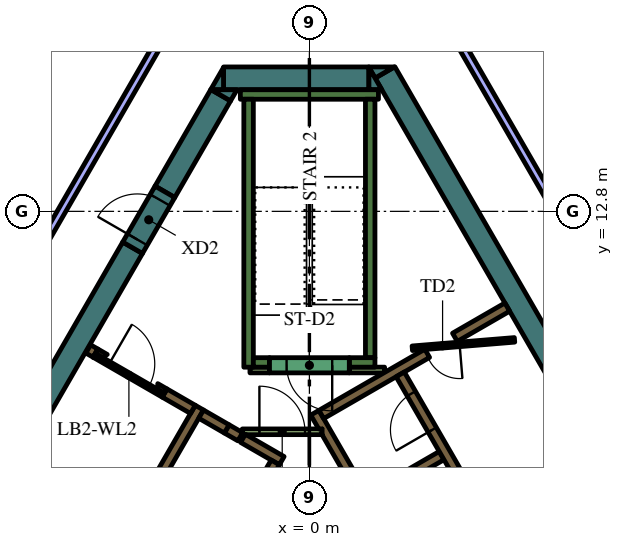
"""IFC4 building model, lengths in metres.
Left out: names, types, materials, properties, quantities, classifications, styles, units other than length and angle.
Written with IfcOpenShell. Run it as: python <this file> out.ifc"""

import sys

from ifc_helpers import new_model, si_unit, direction, frame, frame_2d, origin, place, context, subcontext, project, spatial, polyline, rectangle, outline, extrude, element, fill, save


model = new_model("IFC4")
c1 = context("Model", 3, precision=1e-05, world=origin(), true_north=direction((0.0, 1.0)))
c2 = subcontext(c1, "Body", "Model", "MODEL_VIEW")
j1 = project(units=[si_unit("LENGTHUNIT", "METRE"), si_unit("PLANEANGLEUNIT", "RADIAN")], contexts=[c1])
p1 = place(None, origin())
s1 = spatial("IfcSite", under=j1, at=p1, CompositionType="ELEMENT")
p2 = place(p1, origin())
s2 = spatial("IfcBuilding", under=s1, at=p2, CompositionType="ELEMENT")
p3 = place(p2, frame((0.0, 0.0, 283.8)))
s3 = spatial("IfcBuildingStorey", under=s2, at=p3, CompositionType="ELEMENT", Elevation=283.8)
p4 = place(p3, frame((1.989, 16.456, 0.0), z_axis=(0.0, 0.0, 1.0), x_axis=(0.49999102663, -0.8660305845, 0.0)))
e1 = element("IfcWall", 1, at=p4, inside=s3, PredefinedType="SOLIDWALL", context=c2, shape_type="SweptSolid", body=[
    extrude(rectangle(XDim=12.406, YDim=0.6, at=frame_2d((6.203, 0.0))), origin(), (0.0, 0.0, 1.0), 4.2),
])
p5 = place(p3, origin())
e2 = element("IfcWall", 2, at=p5, inside=s3, PredefinedType="SOLIDWALL", context=c2, shape_type="SweptSolid", body=[
    extrude(outline(polyline([(1.559, 16.6), (2.235, 16.6), (1.728, 16.307), (1.559, 16.6)])), origin(), (0.0, 0.0, 1.0), 4.2),
])
p6 = place(p3, frame((-2.258, 16.3, 0.0), z_axis=(0.0, 0.0, 1.0), x_axis=(1.0, 0.0, 0.0)))
e3 = element("IfcWall", 3, at=p6, inside=s3, PredefinedType="SOLIDWALL", context=c2, shape_type="SweptSolid", body=[
    extrude(rectangle(XDim=3.823, YDim=0.6, at=frame_2d((1.912, 0.0))), origin(), (0.0, 0.0, 1.0), 4.2),
])
e4 = element("IfcWall", 4, at=p5, inside=s3, PredefinedType="SOLIDWALL", context=c2, shape_type="SweptSolid", body=[
    extrude(outline(polyline([(1.905, 16.0), (1.567, 16.0), (1.567, 16.585), (1.905, 16.0)])), origin(), (0.0, 0.0, 1.0), 4.2),
])
e5 = element("IfcWall", 5, at=p5, inside=s3, PredefinedType="SOLIDWALL", context=c2, shape_type="SweptSolid", body=[
    extrude(outline(polyline([(-2.598, 16.0), (-2.26, 16.585), (-2.26, 16.0), (-2.598, 16.0)])), origin(), (0.0, 0.0, 1.0), 4.2),
])
p7 = place(p3, frame((-2.335, 15.855, 0.0), z_axis=(0.0, 0.0, 1.0), x_axis=(-0.499960127962, -0.866048422692, 0.0)))
e6 = element("IfcWall", 6, at=p7, inside=s3, PredefinedType="SOLIDWALL", context=c2, shape_type="SweptSolid", body=[
    extrude(rectangle(XDim=2.934, YDim=0.6, at=frame_2d((1.467, 0.0))), origin(), (0.0, 0.0, 1.0), 4.2),
])
e7 = element("IfcWall", 7, at=p5, inside=s3, PredefinedType="SOLIDWALL", context=c2, shape_type="SweptSolid", body=[
    extrude(outline(polyline([(-1.905, 16.0), (-2.074, 15.707), (-2.581, 16.0), (-1.905, 16.0)])), origin(), (0.0, 0.0, 1.0), 4.2),
])
e8 = element("IfcWall", 8, at=p5, inside=s3, PredefinedType="SOLIDWALL", context=c2, shape_type="SweptSolid", body=[
    extrude(outline(polyline([(-15.502, -6.35), (-4.912, 11.992), (-4.393, 11.692), (-10.815, 0.569), (-10.84, 0.583), (-10.84, 0.583), (-10.84, 0.583), (-10.965, 0.367), (-10.965, 0.367), (-10.965, 0.367), (-10.94, 0.352), (-11.033, 0.191), (-14.809, -6.35), (-15.156, -6.95), (-15.502, -6.35)])), origin(), (0.0, 0.0, 1.0), 4.2),
])
p8 = place(p3, frame((-1.817, 15.875, 0.0), z_axis=(0.0, 0.0, 1.0), x_axis=(1.0, 0.0, 0.0)))
e9 = element("IfcWall", 9, at=p8, inside=s3, PredefinedType="SOLIDWALL", context=c2, shape_type="SweptSolid", body=[
    extrude(rectangle(XDim=3.634, YDim=0.25, at=frame_2d((1.817, 0.0))), origin(), (0.0, 0.0, 1.0), 4.2),
])
p9 = place(p3, frame((1.6, 8.95, 0.0), z_axis=(0.0, 0.0, 1.0), x_axis=(0.0, 1.0, 0.0)))
e10 = element("IfcWall", 10, at=p9, inside=s3, PredefinedType="SOLIDWALL", context=c2, shape_type="SweptSolid", body=[
    extrude(rectangle(XDim=6.8, YDim=0.25, at=frame_2d((3.4, 0.0))), origin(), (0.0, 0.0, 1.0), 4.2),
])
p10 = place(p3, frame((1.05, 8.825, 0.0), z_axis=(0.0, 0.0, 1.0), x_axis=(1.0, 0.0, 0.0)))
e11 = element("IfcWall", 11, at=p10, inside=s3, PredefinedType="SOLIDWALL", context=c2, shape_type="SweptSolid", body=[
    extrude(rectangle(XDim=0.675, YDim=0.25, at=frame_2d((0.337, 0.0))), origin(), (0.0, 0.0, 1.0), 4.2),
])
p11 = place(p3, frame((-1.6, 8.7, 0.0), z_axis=(0.0, 0.0, 1.0), x_axis=(0.0, 1.0, 0.0)))
e12 = element("IfcWall", 12, at=p11, inside=s3, PredefinedType="SOLIDWALL", context=c2, shape_type="SweptSolid", body=[
    extrude(rectangle(XDim=7.05, YDim=0.25, at=frame_2d((3.525, 0.0))), origin(), (0.0, 0.0, 1.0), 4.2),
])
p12 = place(p3, frame((-1.475, 8.825, 0.0), z_axis=(0.0, 0.0, 1.0), x_axis=(1.0, 0.0, 0.0)))
e13 = element("IfcWall", 13, at=p12, inside=s3, PredefinedType="SOLIDWALL", context=c2, shape_type="SweptSolid", body=[
    extrude(rectangle(XDim=0.425, YDim=0.25, at=frame_2d((0.212, 0.0))), origin(), (0.0, 0.0, 1.0), 4.2),
])
e14 = element("IfcWall", 14, at=p5, inside=s3, PredefinedType="SOLIDWALL", context=c2, shape_type="SweptSolid", body=[
    extrude(outline(polyline([(0.332, 6.925), (0.335, 6.925), (0.335, 6.925), (0.335, 6.925), (0.335, 7.075), (0.335, 7.075), (0.335, 7.075), (0.245, 7.075), (0.035, 7.439), (0.252, 7.564), (0.377, 7.348), (1.512, 5.382), (1.637, 5.165), (2.221, 4.153), (2.771, 3.199), (2.896, 2.983), (3.138, 2.564), (4.031, 1.017), (4.156, 0.801), (5.292, -1.165), (5.417, -1.382), (6.073, -2.519), (6.552, -3.348), (6.677, -3.564), (6.46, -3.689), (0.332, 6.925)])), origin(), (0.0, 0.0, 1.0), 4.2),
])
p13 = place(p3, frame((3.1, 9.064, 0.0), z_axis=(0.0, 0.0, 1.0), x_axis=(-0.866030133475, -0.499991807846, 0.0)))
e15 = element("IfcWall", 15, at=p13, inside=s3, PredefinedType="SOLIDWALL", context=c2, shape_type="SweptSolid", body=[
    extrude(rectangle(XDim=3.217, YDim=0.25, at=frame_2d((1.608, 0.0))), origin(), (0.0, 0.0, 1.0), 4.2),
])
p14 = place(p3, frame((1.574, 5.274, 0.0), z_axis=(0.0, 0.0, 1.0), x_axis=(0.866028486751, 0.499994660107, 0.0)))
e16 = element("IfcWall", 16, at=p14, inside=s3, PredefinedType="SOLIDWALL", context=c2, shape_type="SweptSolid", body=[
    extrude(rectangle(XDim=2.2, YDim=0.25, at=frame_2d((1.1, 0.0))), origin(), (0.0, 0.0, 1.0), 4.2),
])
p15 = place(p3, frame((3.83, 9.486, 0.0), z_axis=(0.0, 0.0, 1.0), x_axis=(0.865986202621, 0.500067892261, 0.0)))
e17 = element("IfcWall", 17, at=p15, inside=s3, PredefinedType="SOLIDWALL", context=c2, shape_type="SweptSolid", body=[
    extrude(rectangle(XDim=1.591, YDim=0.25, at=frame_2d((0.795, 0.0))), origin(), (0.0, 0.0, 1.0), 4.2),
])
p16 = place(p3, frame((-8.06, -1.311, 0.0), z_axis=(0.0, 0.0, 1.0), x_axis=(0.50000273126, 0.866023826885, 0.0)))
e18 = element("IfcWall", 18, at=p16, inside=s3, PredefinedType="SOLIDWALL", context=c2, shape_type="SweptSolid", body=[
    extrude(rectangle(XDim=10.33, YDim=0.25, at=frame_2d((5.165, 0.0))), origin(), (0.0, 0.0, 1.0), 4.2),
])
p17 = place(p3, frame((-1.819, 6.87, 0.0), z_axis=(0.0, 0.0, 1.0), x_axis=(-0.866294599386, 0.499533449405, 0.0)))
e19 = element("IfcWall", 19, at=p17, inside=s3, PredefinedType="SOLIDWALL", context=c2, shape_type="SweptSolid", body=[
    extrude(rectangle(XDim=0.41, YDim=0.25, at=frame_2d((0.205, 0.0))), origin(), (0.0, 0.0, 1.0), 4.2),
])
p18 = place(p3, frame((-2.849, 7.465, 0.0), z_axis=(0.0, 0.0, 1.0), x_axis=(0.865955664968, -0.500120771724, 0.0)))
e20 = element("IfcWall", 20, at=p18, inside=s3, PredefinedType="SOLIDWALL", context=c2, shape_type="SweptSolid", body=[
    extrude(rectangle(XDim=0.778, YDim=0.25, at=frame_2d((0.389, 0.0))), origin(), (0.0, 0.0, 1.0), 4.2),
])
p19 = place(p3, frame((-0.728, 6.24, 0.0), z_axis=(0.0, 0.0, 1.0), x_axis=(-0.866002680491, 0.500039355833, 0.0)))
e21 = element("IfcWall", 21, at=p19, inside=s3, PredefinedType="SOLIDWALL", context=c2, shape_type="SweptSolid", body=[
    extrude(rectangle(XDim=1.178, YDim=0.25, at=frame_2d((0.589, 0.0))), origin(), (0.0, 0.0, 1.0), 4.2),
])
p20 = place(p3, frame((-5.629, 9.07, 0.0), z_axis=(0.0, 0.0, 1.0), x_axis=(-0.866185586049, 0.49972245349, 0.0)))
e22 = element("IfcWall", 22, at=p20, inside=s3, PredefinedType="SOLIDWALL", context=c2, shape_type="SweptSolid", body=[
    extrude(rectangle(XDim=0.22, YDim=0.25, at=frame_2d((0.11, 0.0))), origin(), (0.0, 0.0, 1.0), 4.2),
])
p21 = place(p3, frame((-3.809, 8.019, 0.0), z_axis=(0.0, 0.0, 1.0), x_axis=(0.866010229787, -0.500026281214, 0.0)))
e23 = element("IfcWall", 23, at=p21, inside=s3, PredefinedType="SOLIDWALL", context=c2, shape_type="SweptSolid", body=[
    extrude(rectangle(XDim=0.858, YDim=0.25, at=frame_2d((0.429, 0.0))), origin(), (0.0, 0.0, 1.0), 4.2),
])
e24 = element("IfcWall", 24, at=p5, inside=s3, PredefinedType="SOLIDWALL", context=c2, shape_type="SweptSolid", body=[
    extrude(outline(polyline([(-3.748, 8.128), (-3.813, 8.015), (-4.027, 8.139), (-4.017, 8.156), (-4.008, 8.173), (-4.0, 8.192), (-3.995, 8.21), (-3.991, 8.23), (-3.99, 8.25), (-3.99, 8.268), (-3.748, 8.128)])), origin(), (0.0, 0.0, 1.0), 4.2),
])
e25 = element("IfcWall", 25, at=p5, inside=s3, PredefinedType="SOLIDWALL", context=c2, shape_type="SweptSolid", body=[
    extrude(outline(polyline([(-5.689, 8.96), (-5.69, 8.961), (-5.565, 9.177), (-5.319, 9.035), (-5.335, 9.026), (-5.351, 9.015), (-5.366, 9.002), (-5.379, 8.988), (-5.392, 8.972), (-5.402, 8.956), (-5.412, 8.939), (-5.629, 9.064), (-5.629, 9.064), (-5.689, 8.96)])), origin(), (0.0, 0.0, 1.0), 4.2),
])
p22 = place(p3, frame((1.05, 8.625, 0.0), z_axis=(0.0, 0.0, 1.0), x_axis=(1.0, 0.0, 0.0)))
e26 = element("IfcWall", 26, at=p22, inside=s3, PredefinedType="PARTITIONING", context=c2, shape_type="SweptSolid", body=[
    extrude(rectangle(XDim=0.929, YDim=0.15, at=frame_2d((0.464, 0.0))), origin(), (0.0, 0.0, 1.0), 3.55),
])
p23 = place(p3, frame((-1.564, 8.625, 0.0), z_axis=(0.0, 0.0, 1.0), x_axis=(1.0, 0.0, 0.0)))
e27 = element("IfcWall", 27, at=p23, inside=s3, PredefinedType="PARTITIONING", context=c2, shape_type="SweptSolid", body=[
    extrude(rectangle(XDim=0.514, YDim=0.15, at=frame_2d((0.257, 0.0))), origin(), (0.0, 0.0, 1.0), 3.55),
])
p24 = place(p3, frame((8.565, -2.185, 0.0), z_axis=(0.0, 0.0, 1.0), x_axis=(-0.499997954832, 0.866026584559, 0.0)))
e28 = element("IfcWall", 28, at=p24, inside=s3, PredefinedType="SOLIDWALL", context=c2, shape_type="SweptSolid", body=[
    extrude(rectangle(XDim=12.35, YDim=0.25, at=frame_2d((6.175, 0.0))), origin(), (0.0, 0.0, 1.0), 4.2),
])
p25 = place(p24, frame((0.685, 0.0, 0.0)))
e29 = element("IfcOpeningElement", 29, at=p25, cuts=e28, PredefinedType="OPENING", context=c2, shape_type="SweptSolid", body=[
    extrude(rectangle(XDim=0.9, YDim=2.1, at=frame_2d((0.45, 1.05))), frame((0.0, 0.135, 0.0), z_axis=(0.0, -1.0, 0.0), x_axis=(1.0, 0.0, 0.0)), (0.0, 0.0, 1.0), 0.27),
])
p26 = place(p24, frame((3.105, 0.0, 0.0)))
e30 = element("IfcOpeningElement", 30, at=p26, cuts=e28, PredefinedType="OPENING", context=c2, shape_type="SweptSolid", body=[
    extrude(rectangle(XDim=1.1, YDim=2.1, at=frame_2d((0.55, 1.05))), frame((0.0, 0.135, 0.0), z_axis=(0.0, -1.0, 0.0), x_axis=(1.0, 0.0, 0.0)), (0.0, 0.0, 1.0), 0.27),
])
p27 = place(p24, frame((5.625, 0.0, 0.0)))
e31 = element("IfcOpeningElement", 31, at=p27, cuts=e28, PredefinedType="OPENING", context=c2, shape_type="SweptSolid", body=[
    extrude(rectangle(XDim=1.1, YDim=2.1, at=frame_2d((0.55, 1.05))), frame((0.0, 0.135, 0.0), z_axis=(0.0, -1.0, 0.0), x_axis=(1.0, 0.0, 0.0)), (0.0, 0.0, 1.0), 0.27),
])
p28 = place(p24, frame((8.145, 0.0, 0.0)))
e32 = element("IfcOpeningElement", 32, at=p28, cuts=e28, PredefinedType="OPENING", context=c2, shape_type="SweptSolid", body=[
    extrude(rectangle(XDim=1.1, YDim=2.1, at=frame_2d((0.55, 1.05))), frame((0.0, 0.135, 0.0), z_axis=(0.0, -1.0, 0.0), x_axis=(1.0, 0.0, 0.0)), (0.0, 0.0, 1.0), 0.27),
])
p29 = place(p24, frame((10.665, 0.0, 0.0)))
e33 = element("IfcOpeningElement", 33, at=p29, cuts=e28, PredefinedType="OPENING", context=c2, shape_type="SweptSolid", body=[
    extrude(rectangle(XDim=1.1, YDim=2.1, at=frame_2d((0.55, 1.05))), frame((0.0, 0.135, 0.0), z_axis=(0.0, -1.0, 0.0), x_axis=(1.0, 0.0, 0.0)), (0.0, 0.0, 1.0), 0.27),
])
p30 = place(p3, frame((-0.898, 6.194, 0.0), z_axis=(0.0, 0.0, 1.0), x_axis=(-0.499996202215, -0.866027596426, 0.0)))
e34 = element("IfcWall", 34, at=p30, inside=s3, PredefinedType="SOLIDWALL", context=c2, shape_type="SweptSolid", body=[
    extrude(rectangle(XDim=9.83, YDim=0.25, at=frame_2d((4.915, 0.0))), origin(), (0.0, 0.0, 1.0), 4.2),
])
p31 = place(p30, frame((0.585, 0.0, 0.0)))
e35 = element("IfcOpeningElement", 35, at=p31, cuts=e34, PredefinedType="OPENING", context=c2, shape_type="SweptSolid", body=[
    extrude(rectangle(XDim=1.1, YDim=2.1, at=frame_2d((0.55, 1.05))), frame((0.0, 0.135, 0.0), z_axis=(0.0, -1.0, 0.0), x_axis=(1.0, 0.0, 0.0)), (0.0, 0.0, 1.0), 0.27),
])
p32 = place(p30, frame((3.105, 0.0, 0.0)))
e36 = element("IfcOpeningElement", 36, at=p32, cuts=e34, PredefinedType="OPENING", context=c2, shape_type="SweptSolid", body=[
    extrude(rectangle(XDim=1.1, YDim=2.1, at=frame_2d((0.55, 1.05))), frame((0.0, 0.135, 0.0), z_axis=(0.0, -1.0, 0.0), x_axis=(1.0, 0.0, 0.0)), (0.0, 0.0, 1.0), 0.27),
])
p33 = place(p30, frame((5.625, 0.0, 0.0)))
e37 = element("IfcOpeningElement", 37, at=p33, cuts=e34, PredefinedType="OPENING", context=c2, shape_type="SweptSolid", body=[
    extrude(rectangle(XDim=1.1, YDim=2.1, at=frame_2d((0.55, 1.05))), frame((0.0, 0.135, 0.0), z_axis=(0.0, -1.0, 0.0), x_axis=(1.0, 0.0, 0.0)), (0.0, 0.0, 1.0), 0.27),
])
p34 = place(p30, frame((8.145, 0.0, 0.0)))
e38 = element("IfcOpeningElement", 38, at=p34, cuts=e34, PredefinedType="OPENING", context=c2, shape_type="SweptSolid", body=[
    extrude(rectangle(XDim=1.1, YDim=2.1, at=frame_2d((0.55, 1.05))), frame((0.0, 0.135, 0.0), z_axis=(0.0, -1.0, 0.0), x_axis=(1.0, 0.0, 0.0)), (0.0, 0.0, 1.0), 0.27),
])
p35 = place(p3, frame((1.05, 8.75, 0.0), z_axis=(0.0, 0.0, 1.0), x_axis=(-1.0, 0.0, 0.0)))
e39 = element("IfcWall", 39, at=p35, inside=s3, PredefinedType="SOLIDWALL", context=c2, shape_type="SweptSolid", body=[
    extrude(rectangle(XDim=2.1, YDim=0.4, at=frame_2d((1.05, 0.0))), origin(), (0.0, 0.0, 1.0), 4.2),
])
p36 = place(p35, frame((0.45, 0.0, 0.0)))
e40 = element("IfcOpeningElement", 40, at=p36, cuts=e39, PredefinedType="OPENING", context=c2, shape_type="SweptSolid", body=[
    extrude(rectangle(XDim=1.2, YDim=2.1, at=frame_2d((0.6, 1.05))), frame((0.0, 0.21, 0.0), z_axis=(0.0, -1.0, 0.0), x_axis=(1.0, 0.0, 0.0)), (0.0, 0.0, 1.0), 0.42),
])
p37 = place(p3, frame((5.398, 9.419, 0.0), z_axis=(0.0, 0.0, 1.0), x_axis=(-0.996653416376, -0.081743303248, 0.0)))
e41 = element("IfcWall", 41, at=p37, inside=s3, PredefinedType="PARTITIONING", context=c2, shape_type="SweptSolid", body=[
    extrude(rectangle(XDim=2.7, YDim=0.12, at=frame_2d((1.35, 0.0))), origin(), (0.0, 0.0, 1.0), 3.55),
])
p38 = place(p37, frame((1.45, 0.0, 0.0)))
e42 = element("IfcOpeningElement", 42, at=p38, cuts=e41, PredefinedType="OPENING", context=c2, shape_type="SweptSolid", body=[
    extrude(rectangle(XDim=0.9, YDim=2.1, at=frame_2d((0.45, 1.05))), frame((0.0, 0.07, 0.0), z_axis=(0.0, -1.0, 0.0), x_axis=(1.0, 0.0, 0.0)), (0.0, 0.0, 1.0), 0.14),
])
p39 = place(p3, frame((-1.765, 7.0, 0.0), z_axis=(0.0, 0.0, 1.0), x_axis=(1.0, 0.0, 0.0)))
e43 = element("IfcWall", 43, at=p39, inside=s3, PredefinedType="PARTITIONING", context=c2, shape_type="SweptSolid", body=[
    extrude(rectangle(XDim=2.1, YDim=0.15, at=frame_2d((1.05, 0.0))), origin(), (0.0, 0.0, 1.0), 3.55),
])
p40 = place(p39, frame((0.45, 0.0, 0.0)))
e44 = element("IfcOpeningElement", 44, at=p40, cuts=e43, PredefinedType="OPENING", context=c2, shape_type="SweptSolid", body=[
    extrude(rectangle(XDim=1.2, YDim=2.1, at=frame_2d((0.6, 1.05))), frame((0.0, 0.085, 0.0), z_axis=(0.0, -1.0, 0.0), x_axis=(1.0, 0.0, 0.0)), (0.0, 0.0, 1.0), 0.17),
])
p41 = place(p3, frame((-5.659, 9.012, 0.0), z_axis=(0.0, 0.0, 1.0), x_axis=(0.866009402589, -0.500027713859, 0.0)))
e45 = element("IfcWall", 45, at=p41, inside=s3, PredefinedType="PARTITIONING", context=c2, shape_type="SweptSolid", body=[
    extrude(rectangle(XDim=2.1, YDim=0.12, at=frame_2d((1.05, 0.0))), origin(), (0.0, 0.0, 1.0), 3.55),
])
p42 = place(p41, frame((0.45, 0.0, 0.0)))
e46 = element("IfcOpeningElement", 46, at=p42, cuts=e45, PredefinedType="OPENING", context=c2, shape_type="SweptSolid", body=[
    extrude(rectangle(XDim=1.2, YDim=2.1, at=frame_2d((0.6, 1.05))), frame((0.0, 0.07, 0.0), z_axis=(0.0, -1.0, 0.0), x_axis=(1.0, 0.0, 0.0)), (0.0, 0.0, 1.0), 0.14),
])
p43 = place(p3, frame((-4.652, 11.842, 0.0), z_axis=(0.0, 0.0, 1.0), x_axis=(0.500062241894, 0.865989465428, 0.0)))
e47 = element("IfcWall", 47, at=p43, inside=s3, PredefinedType="SOLIDWALL", context=c2, shape_type="SweptSolid", body=[
    extrude(rectangle(XDim=1.7, YDim=0.6, at=frame_2d((0.85, 0.0))), origin(), (0.0, 0.0, 1.0), 4.2),
])
p44 = place(p43, frame((0.25, 0.0, 0.0)))
e48 = element("IfcOpeningElement", 48, at=p44, cuts=e47, PredefinedType="OPENING", context=c2, shape_type="SweptSolid", body=[
    extrude(rectangle(XDim=1.2, YDim=2.1, at=frame_2d((0.6, 1.05))), frame((0.0, 0.31, 0.0), z_axis=(0.0, -1.0, 0.0), x_axis=(1.0, 0.0, 0.0)), (0.0, 0.0, 1.0), 0.62),
])
p45 = place(p3, frame((7.421, 11.247, 0.0), z_axis=(0.0, 0.0, 1.0), x_axis=(-0.499999024953, 0.866025966727, 0.0)))
e49 = element("IfcWall", 49, at=p45, inside=s3, PredefinedType="PARTITIONING", context=c2, shape_type="SweptSolid", body=[
    extrude(rectangle(XDim=7.769, YDim=0.2, at=frame_2d((3.884, 0.0))), origin(), (0.0, 0.0, 1.0), 3.55),
])
p46 = place(p3, frame((-7.962, 15.8, 0.0), z_axis=(0.0, 0.0, 1.0), x_axis=(0.599541489613, 0.800343677574, 0.0)))
e50 = element("IfcWall", 50, at=p46, inside=s3, PredefinedType="PARTITIONING", context=c2, shape_type="SweptSolid", body=[
    extrude(rectangle(XDim=4.942, YDim=0.15, at=frame_2d((2.471, 0.0))), origin(), (0.0, 0.0, 1.0), 3.55),
])
p47 = place(p46, frame((2.042, 0.0, 0.0)))
e51 = element("IfcOpeningElement", 51, at=p47, cuts=e50, PredefinedType="OPENING", context=c2, shape_type="SweptSolid", body=[
    extrude(rectangle(XDim=0.9, YDim=2.1, at=frame_2d((0.45, 1.05))), frame((0.0, 0.085, 0.0), z_axis=(0.0, -1.0, 0.0), x_axis=(1.0, 0.0, 0.0)), (0.0, 0.0, 1.0), 0.17),
])
p48 = place(p3, frame((-3.306, 18.374, 0.0), z_axis=(0.0, 0.0, 1.0), x_axis=(-0.499999798456, -0.866025520146, 0.0)))
e52 = element("IfcWall", 52, at=p48, inside=s3, PredefinedType="PARTITIONING", context=c2, shape_type="SweptSolid", body=[
    extrude(rectangle(XDim=8.229, YDim=0.2, at=frame_2d((4.115, 0.0))), origin(), (0.0, 0.0, 1.0), 3.55),
])
p49 = place(p29, origin())
e53 = element("IfcDoor", 53, at=p49, inside=s3, OperationType="DOUBLE_DOOR_SLIDING", PredefinedType="DOOR", context=c2, shape_type="SweptSolid", body=[
    extrude(rectangle(XDim=1.1, YDim=2.1, at=frame_2d((0.55, 1.05))), frame((0.0, 0.025, 0.0), z_axis=(0.0, -1.0, 0.0), x_axis=(1.0, 0.0, 0.0)), (0.0, 0.0, 1.0), 0.05),
])
fill(e33, e53)
p50 = place(p36, origin())
e54 = element("IfcDoor", 54, at=p50, inside=s3, OperationType="SINGLE_SWING_LEFT", PredefinedType="DOOR", context=c2, shape_type="SweptSolid", body=[
    extrude(rectangle(XDim=1.2, YDim=2.1, at=frame_2d((0.6, 1.05))), frame((0.0, 0.025, 0.0), z_axis=(0.0, -1.0, 0.0), x_axis=(1.0, 0.0, 0.0)), (0.0, 0.0, 1.0), 0.05),
])
fill(e40, e54)
p51 = place(p38, origin())
e55 = element("IfcDoor", 55, at=p51, inside=s3, OperationType="SINGLE_SWING_LEFT", PredefinedType="DOOR", context=c2, shape_type="SweptSolid", body=[
    extrude(rectangle(XDim=0.9, YDim=2.1, at=frame_2d((0.45, 1.05))), frame((0.0, 0.025, 0.0), z_axis=(0.0, -1.0, 0.0), x_axis=(1.0, 0.0, 0.0)), (0.0, 0.0, 1.0), 0.05),
])
fill(e42, e55)
p52 = place(p40, origin())
e56 = element("IfcDoor", 56, at=p52, inside=s3, OperationType="SINGLE_SWING_LEFT", PredefinedType="DOOR", context=c2, shape_type="SweptSolid", body=[
    extrude(rectangle(XDim=1.2, YDim=2.1, at=frame_2d((0.6, 1.05))), frame((0.0, 0.025, 0.0), z_axis=(0.0, -1.0, 0.0), x_axis=(1.0, 0.0, 0.0)), (0.0, 0.0, 1.0), 0.05),
])
fill(e44, e56)
p53 = place(p42, origin())
e57 = element("IfcDoor", 57, at=p53, inside=s3, OperationType="SINGLE_SWING_LEFT", PredefinedType="DOOR", context=c2, shape_type="SweptSolid", body=[
    extrude(rectangle(XDim=1.2, YDim=2.1, at=frame_2d((0.6, 1.05))), frame((0.0, 0.025, 0.0), z_axis=(0.0, -1.0, 0.0), x_axis=(1.0, 0.0, 0.0)), (0.0, 0.0, 1.0), 0.05),
])
fill(e46, e57)
p54 = place(p44, origin())
e58 = element("IfcDoor", 58, at=p54, inside=s3, OperationType="SINGLE_SWING_LEFT", PredefinedType="DOOR", context=c2, shape_type="SweptSolid", body=[
    extrude(rectangle(XDim=1.2, YDim=2.1, at=frame_2d((0.6, 1.05))), frame((0.0, 0.025, 0.0), z_axis=(0.0, -1.0, 0.0), x_axis=(1.0, 0.0, 0.0)), (0.0, 0.0, 1.0), 0.05),
])
fill(e48, e58)
save(model, sys.argv[1])
